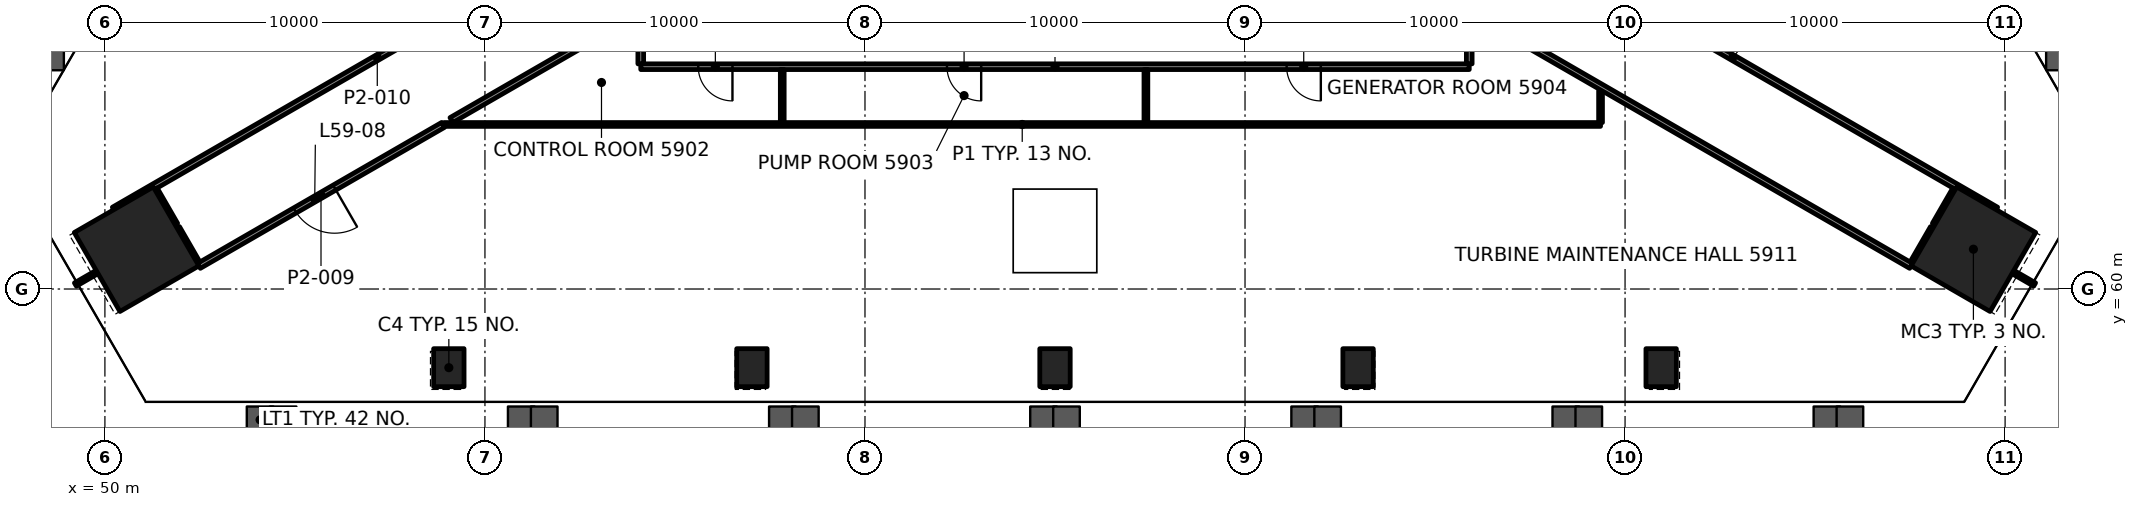
"""IFC4 building model, lengths in metres.
Left out: names, types, materials, properties, quantities, classifications, styles, units other than length and angle.
Written with IfcOpenShell. Run it as: python <this file> out.ifc"""

import sys

from ifc_helpers import new_model, si_unit, direction, frame, frame_2d, origin, origin_2d, place, context, subcontext, project, spatial, rectangle, hollow_rectangle, extrude, element, fill, save


model = new_model("IFC4")
c1 = context("Model", 3, precision=1e-05, world=origin(), true_north=direction((0.0, 1.0)))
c2 = subcontext(c1, "Body", "Model", "MODEL_VIEW")
j1 = project(units=[si_unit("LENGTHUNIT", "METRE"), si_unit("PLANEANGLEUNIT", "RADIAN")], contexts=[c1])
p1 = place(None, origin())
s1 = spatial("IfcSite", under=j1, at=p1, CompositionType="ELEMENT")
p2 = place(p1, origin())
s2 = spatial("IfcBuilding", under=s1, at=p2, CompositionType="ELEMENT")
p3 = place(p2, frame((0.0, 0.0, 252.1)))
s3 = spatial("IfcBuildingStorey", under=s2, at=p3, CompositionType="ELEMENT", Elevation=252.1)
for number, where, z_axis, x_axis in (
    (1, (99.166, 61.048, 0.0), (0.0, 0.0, 1.0), (0.5, 0.866, 0.0)),
    (2, (50.834, 61.048, 0.0), (0.0, 0.0, 1.0), (0.5, -0.866, 0.0)),
):
    element("IfcColumn", number, at=place(p3, frame(where, z_axis=z_axis, x_axis=x_axis)), inside=s3, PredefinedType="COLUMN", context=c2, shape_type="SweptSolid", body=[
        extrude(rectangle(XDim=2.4, YDim=2.4, at=origin_2d()), origin(), (0.0, 0.0, 1.0), 4.5),
    ])
for number, where, z_axis, x_axis in (
    (3, (59.05, 57.93, -0.0), (0.0, 0.0, 1.0), (1.0, 0.0, 0.0)),
    (4, (67.025, 57.93, -0.0), (0.0, 0.0, 1.0), (1.0, 0.0, 0.0)),
    (5, (75.0, 57.93, -0.0), (0.0, 0.0, 1.0), (1.0, 0.0, 0.0)),
    (6, (82.975, 57.93, -0.0), (0.0, 0.0, 1.0), (1.0, 0.0, 0.0)),
    (7, (90.95, 57.93, -0.0), (0.0, 0.0, 1.0), (1.0, 0.0, 0.0)),
):
    element("IfcColumn", number, at=place(p3, frame(where, z_axis=z_axis, x_axis=x_axis)), inside=s3, PredefinedType="COLUMN", context=c2, shape_type="SweptSolid", body=[
        extrude(hollow_rectangle(XDim=0.8, YDim=1.0, WallThickness=0.05, at=origin_2d()), origin(), (0.0, 0.0, 1.0), 4.5),
    ])
p4 = place(p3, frame((58.921, 64.33, 0.0), z_axis=(0.0, 0.0, 1.0), x_axis=(1.0, 0.0, 0.0)))
e8 = element("IfcWall", 8, at=p4, inside=s3, PredefinedType="PARTITIONING", context=c2, shape_type="SweptSolid", body=[
    extrude(rectangle(XDim=30.434, YDim=0.1, at=frame_2d((15.217, 0.0))), origin(), (0.0, 0.0, 1.0), 3.7),
])
p5 = place(p3, frame((85.9, 65.85, 0.0), z_axis=(0.0, 0.0, 1.0), x_axis=(-1.0, 0.0, 0.0)))
e9 = element("IfcWall", 9, at=p5, inside=s3, PredefinedType="PARTITIONING", context=c2, shape_type="SweptSolid", body=[
    extrude(rectangle(XDim=21.8, YDim=0.15, at=frame_2d((10.9, 0.0))), origin(), (0.0, 0.0, 1.0), 3.7),
])
p6 = place(p5, frame((3.905, 0.0, 0.0)))
e10 = element("IfcOpeningElement", 10, at=p6, cuts=e9, PredefinedType="OPENING", context=c2, shape_type="SweptSolid", body=[
    extrude(rectangle(XDim=0.9, YDim=2.1, at=frame_2d((0.45, 1.05))), frame((0.0, 0.085, 0.0), z_axis=(0.0, -1.0, 0.0), x_axis=(1.0, 0.0, 0.0)), (0.0, 0.0, 1.0), 0.17),
])
p7 = place(p5, frame((12.843, 0.0, 0.0)))
e11 = element("IfcOpeningElement", 11, at=p7, cuts=e9, PredefinedType="OPENING", context=c2, shape_type="SweptSolid", body=[
    extrude(rectangle(XDim=0.9, YDim=2.1, at=frame_2d((0.45, 1.05))), frame((0.0, 0.085, 0.0), z_axis=(0.0, -1.0, 0.0), x_axis=(1.0, 0.0, 0.0)), (0.0, 0.0, 1.0), 0.17),
])
p8 = place(p5, frame((19.387, 0.0, 0.0)))
e12 = element("IfcOpeningElement", 12, at=p8, cuts=e9, PredefinedType="OPENING", context=c2, shape_type="SweptSolid", body=[
    extrude(rectangle(XDim=0.9, YDim=2.1, at=frame_2d((0.45, 1.05))), frame((0.0, 0.085, 0.0), z_axis=(0.0, -1.0, 0.0), x_axis=(1.0, 0.0, 0.0)), (0.0, 0.0, 1.0), 0.17),
])
p9 = place(p3, frame((58.899, 64.318, 0.0), z_axis=(0.0, 0.0, 1.0), x_axis=(-0.866035440363, -0.499982615733, 0.0)))
e13 = element("IfcWall", 13, at=p9, inside=s3, PredefinedType="PARTITIONING", context=c2, shape_type="SweptSolid", body=[
    extrude(rectangle(XDim=7.419, YDim=0.15, at=frame_2d((3.709, 0.0))), origin(), (0.0, 0.0, 1.0), 3.7),
])
p10 = place(p9, frame((3.3, 0.0, 0.0)))
e14 = element("IfcOpeningElement", 14, at=p10, cuts=e13, PredefinedType="OPENING", context=c2, shape_type="SweptSolid", body=[
    extrude(rectangle(XDim=1.2, YDim=2.1, at=frame_2d((0.6, 1.05))), frame((0.0, 0.085, 0.0), z_axis=(0.0, -1.0, 0.0), x_axis=(1.0, 0.0, 0.0)), (0.0, 0.0, 1.0), 0.17),
])
p11 = place(p3, frame((49.223, 60.118, 0.0), z_axis=(0.0, 0.0, 1.0), x_axis=(0.866030142557, 0.499991792115, 0.0)))
e15 = element("IfcWall", 15, at=p11, inside=s3, PredefinedType="PARTITIONING", context=c2, shape_type="SweptSolid", body=[
    extrude(rectangle(XDim=3.06, YDim=0.1, at=frame_2d((1.53, 0.0))), origin(), (0.0, 0.0, 1.0), 3.7),
])
p12 = place(p3, frame((50.234, 62.087, 0.0), z_axis=(0.0, 0.0, 1.0), x_axis=(0.866022819081, 0.500004476811, 0.0)))
e16 = element("IfcWall", 16, at=p12, inside=s3, PredefinedType="PARTITIONING", context=c2, shape_type="SweptSolid", body=[
    extrude(rectangle(XDim=16.011, YDim=0.15, at=frame_2d((8.005, 0.0))), origin(), (0.0, 0.0, 1.0), 3.7),
])
p13 = place(p12, frame((10.35, 0.0, 0.0)))
e17 = element("IfcOpeningElement", 17, at=p13, cuts=e16, PredefinedType="OPENING", context=c2, shape_type="SweptSolid", body=[
    extrude(rectangle(XDim=0.9, YDim=2.1, at=frame_2d((0.45, 1.05))), frame((0.0, 0.085, 0.0), z_axis=(0.0, -1.0, 0.0), x_axis=(1.0, 0.0, 0.0)), (0.0, 0.0, 1.0), 0.17),
])
p14 = place(p12, frame((14.153, 0.0, 0.0)))
e18 = element("IfcOpeningElement", 18, at=p14, cuts=e16, PredefinedType="OPENING", context=c2, shape_type="SweptSolid", body=[
    extrude(rectangle(XDim=0.9, YDim=2.1, at=frame_2d((0.45, 1.05))), frame((0.0, 0.085, 0.0), z_axis=(0.0, -1.0, 0.0), x_axis=(1.0, 0.0, 0.0)), (0.0, 0.0, 1.0), 0.17),
])
p15 = place(p3, frame((97.565, 60.674, 0.0), z_axis=(0.0, 0.0, 1.0), x_axis=(0.500023985599, 0.866011555249, 0.0)))
e19 = element("IfcWall", 19, at=p15, inside=s3, PredefinedType="PARTITIONING", context=c2, shape_type="SweptSolid", body=[
    extrude(rectangle(XDim=1.075, YDim=0.15, at=frame_2d((0.537, 0.0))), origin(), (0.0, 0.0, 1.0), 3.7),
])
p16 = place(p3, frame((89.355, 64.38, 0.0), z_axis=(0.0, 0.0, 1.0), x_axis=(0.0, 1.0, 0.0)))
e20 = element("IfcWall", 20, at=p16, inside=s3, PredefinedType="PARTITIONING", context=c2, shape_type="SweptSolid", body=[
    extrude(rectangle(XDim=0.829, YDim=0.1, at=frame_2d((0.414, 0.0))), origin(), (0.0, 0.0, 1.0), 3.7),
])
p17 = place(p3, frame((85.9, 65.925, 0.0), z_axis=(0.0, 0.0, 1.0), x_axis=(0.0, 1.0, 0.0)))
e21 = element("IfcWall", 21, at=p17, inside=s3, PredefinedType="PARTITIONING", context=c2, shape_type="SweptSolid", body=[
    extrude(rectangle(XDim=1.26, YDim=0.15, at=frame_2d((0.63, 0.0))), origin(), (0.0, 0.0, 1.0), 3.7),
])
for number, where, z_axis, x_axis in (
    (22, (77.392, 64.39, 0.0), (0.0, 0.0, 1.0), (0.0, 1.0, 0.0)),
    (23, (67.823, 64.39, 0.0), (0.0, 0.0, 1.0), (0.0, 1.0, 0.0)),
):
    element("IfcWall", number, at=place(p3, frame(where, z_axis=z_axis, x_axis=x_axis)), inside=s3, PredefinedType="PARTITIONING", context=c2, shape_type="SweptSolid", body=[
        extrude(rectangle(XDim=1.385, YDim=0.1, at=frame_2d((0.692, 0.0))), origin(), (0.0, 0.0, 1.0), 3.7),
    ])
p18 = place(p3, frame((64.1, 65.925, 0.0), z_axis=(0.0, 0.0, 1.0), x_axis=(0.0, 1.0, 0.0)))
e24 = element("IfcWall", 24, at=p18, inside=s3, PredefinedType="PARTITIONING", context=c2, shape_type="SweptSolid", body=[
    extrude(rectangle(XDim=1.31, YDim=0.15, at=frame_2d((0.655, 0.0))), origin(), (0.0, 0.0, 1.0), 3.7),
])
p19 = place(p3, frame((52.435, 60.674, 0.0), z_axis=(0.0, 0.0, 1.0), x_axis=(-0.500023985599, 0.866011555249, 0.0)))
e25 = element("IfcWall", 25, at=p19, inside=s3, PredefinedType="PARTITIONING", context=c2, shape_type="SweptSolid", body=[
    extrude(rectangle(XDim=1.075, YDim=0.15, at=frame_2d((0.537, 0.0))), origin(), (0.0, 0.0, 1.0), 3.7),
])
p20 = place(p3, frame((99.766, 62.087, 0.0), z_axis=(0.0, 0.0, 1.0), x_axis=(-0.866022819081, 0.500004476811, 0.0)))
e26 = element("IfcWall", 26, at=p20, inside=s3, PredefinedType="PARTITIONING", context=c2, shape_type="SweptSolid", body=[
    extrude(rectangle(XDim=16.011, YDim=0.15, at=frame_2d((8.005, 0.0))), origin(), (0.0, 0.0, 1.0), 3.7),
])
p21 = place(p3, frame((100.777, 60.118, 0.0), z_axis=(0.0, 0.0, 1.0), x_axis=(-0.866030142557, 0.499991792115, 0.0)))
e27 = element("IfcWall", 27, at=p21, inside=s3, PredefinedType="PARTITIONING", context=c2, shape_type="SweptSolid", body=[
    extrude(rectangle(XDim=3.06, YDim=0.1, at=frame_2d((1.53, 0.0))), origin(), (0.0, 0.0, 1.0), 3.7),
])
p22 = place(p3, frame((97.527, 60.609, 0.0), z_axis=(0.0, 0.0, 1.0), x_axis=(-0.866029927832, 0.499992164038, 0.0)))
e28 = element("IfcWall", 28, at=p22, inside=s3, PredefinedType="PARTITIONING", context=c2, shape_type="SweptSolid", body=[
    extrude(rectangle(XDim=13.425, YDim=0.15, at=frame_2d((6.712, 0.0))), origin(), (0.0, 0.0, 1.0), 3.7),
])
p23 = place(p3, frame((59.118, 64.445, 0.0), z_axis=(0.0, 0.0, 1.0), x_axis=(0.866030125237, 0.499991822116, 0.0)))
e29 = element("IfcWall", 29, at=p23, inside=s3, PredefinedType="PARTITIONING", context=c2, shape_type="SweptSolid", body=[
    extrude(rectangle(XDim=5.623, YDim=0.15, at=frame_2d((2.811, 0.0))), origin(), (0.0, 0.0, 1.0), 3.7),
])
for number, where, z_axis, x_axis in (
    (30, (51.848, 61.691, 0.0), (0.0, 0.0, 1.0), (-0.5, 0.866, 0.0)),
    (31, (98.152, 61.691, 0.0), (0.0, 0.0, 1.0), (0.5, 0.866, 0.0)),
):
    element("IfcWall", number, at=place(p3, frame(where, z_axis=z_axis, x_axis=x_axis)), inside=s3, PredefinedType="PARTITIONING", context=c2, shape_type="SweptSolid", body=[
        extrude(rectangle(XDim=1.075, YDim=0.15, at=frame_2d((0.538, 0.0))), origin(), (0.0, 0.0, 1.0), 3.7),
    ])
p24 = place(p6, origin())
e32 = element("IfcDoor", 32, at=p24, inside=s3, OperationType="SINGLE_SWING_RIGHT", PredefinedType="DOOR", context=c2, shape_type="SweptSolid", body=[
    extrude(rectangle(XDim=0.9, YDim=2.1, at=frame_2d((0.45, 1.05))), frame((0.0, 0.025, 0.0), z_axis=(0.0, -1.0, 0.0), x_axis=(1.0, 0.0, 0.0)), (0.0, 0.0, 1.0), 0.05),
])
fill(e10, e32)
p25 = place(p7, origin())
e33 = element("IfcDoor", 33, at=p25, inside=s3, OperationType="SINGLE_SWING_LEFT", PredefinedType="DOOR", context=c2, shape_type="SweptSolid", body=[
    extrude(rectangle(XDim=0.9, YDim=2.1, at=frame_2d((0.45, 1.05))), frame((0.0, 0.025, 0.0), z_axis=(0.0, -1.0, 0.0), x_axis=(1.0, 0.0, 0.0)), (0.0, 0.0, 1.0), 0.05),
])
fill(e11, e33)
p26 = place(p8, origin())
e34 = element("IfcDoor", 34, at=p26, inside=s3, OperationType="SINGLE_SWING_RIGHT", PredefinedType="DOOR", context=c2, shape_type="SweptSolid", body=[
    extrude(rectangle(XDim=0.9, YDim=2.1, at=frame_2d((0.45, 1.05))), frame((0.0, 0.025, 0.0), z_axis=(0.0, -1.0, 0.0), x_axis=(1.0, 0.0, 0.0)), (0.0, 0.0, 1.0), 0.05),
])
fill(e12, e34)
p27 = place(p10, origin())
e35 = element("IfcDoor", 35, at=p27, inside=s3, OperationType="DOUBLE_DOOR_SINGLE_SWING", PredefinedType="DOOR", context=c2, shape_type="SweptSolid", body=[
    extrude(rectangle(XDim=1.2, YDim=2.1, at=frame_2d((0.6, 1.05))), frame((0.0, 0.025, 0.0), z_axis=(0.0, -1.0, 0.0), x_axis=(1.0, 0.0, 0.0)), (0.0, 0.0, 1.0), 0.05),
])
fill(e14, e35)
save(model, sys.argv[1])
